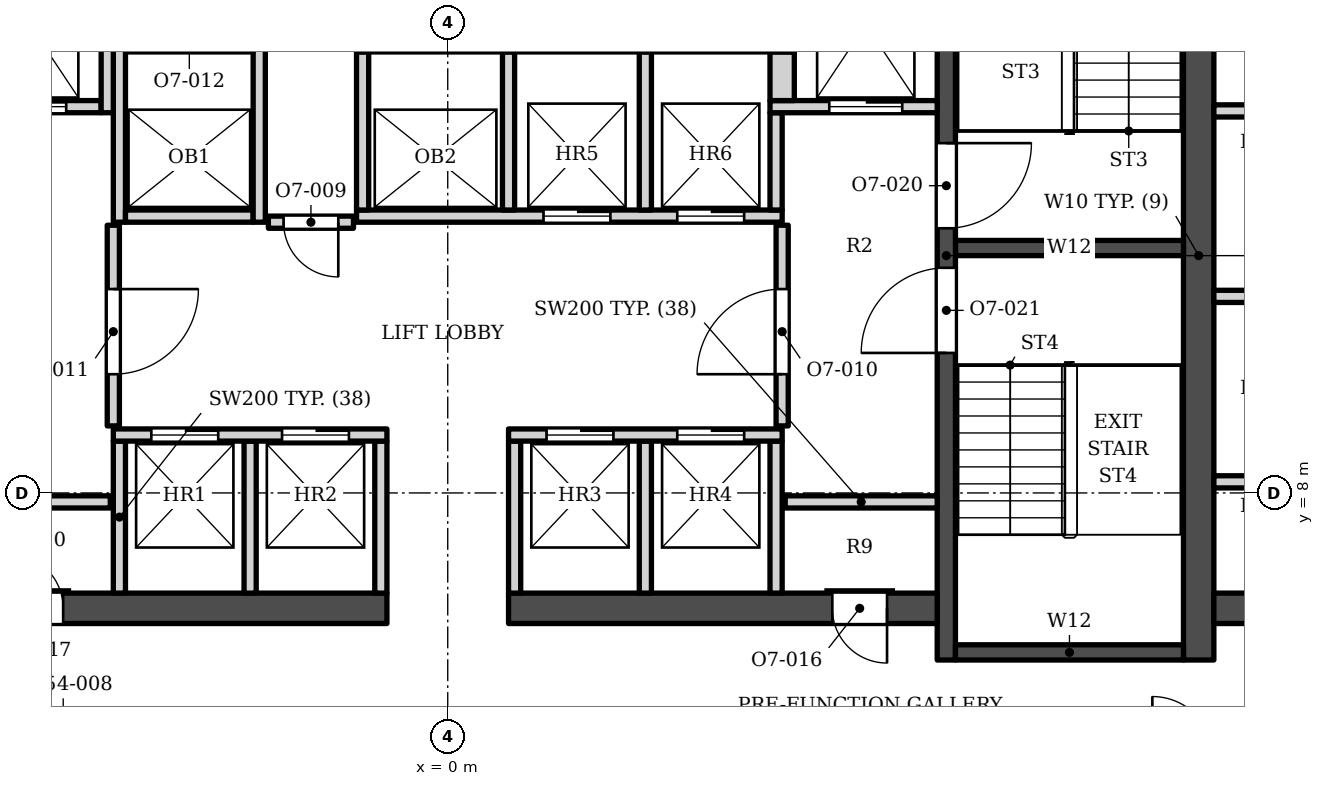
"""IFC4 building model, lengths in metres.
Left out: names, types, materials, properties, quantities, classifications, styles, units other than length and angle.
Written with IfcOpenShell. Run it as: python <this file> out.ifc"""

import sys

from ifc_helpers import new_model, si_unit, direction, frame, frame_2d, origin, place, context, subcontext, project, spatial, rectangle, extrude, element, fill, save


model = new_model("IFC4")
c1 = context("Model", 3, precision=1e-05, world=origin(), true_north=direction((0.0, 1.0)))
c2 = subcontext(c1, "Body", "Model", "MODEL_VIEW")
j1 = project(units=[si_unit("LENGTHUNIT", "METRE"), si_unit("PLANEANGLEUNIT", "RADIAN")], contexts=[c1])
p1 = place(None, origin())
s1 = spatial("IfcSite", under=j1, at=p1, CompositionType="ELEMENT")
p2 = place(p1, origin())
s2 = spatial("IfcBuilding", under=s1, at=p2, CompositionType="ELEMENT")
p3 = place(p2, frame((0.0, 0.0, 219.8)))
s3 = spatial("IfcBuildingStorey", under=s2, at=p3, CompositionType="ELEMENT", Elevation=219.8)
p4 = place(p3, frame((12.35, 5.253, 0.0), z_axis=(0.0, 0.0, 1.0), x_axis=(0.0, 1.0, 0.0)))
e1 = element("IfcWall", 1, at=p4, inside=s3, PredefinedType="SHEAR", context=c2, shape_type="SweptSolid", body=[
    extrude(rectangle(XDim=13.3, YDim=0.5, at=frame_2d((6.65, 0.0))), origin(), (0.0, 0.0, 1.0), 3.9),
])
p5 = place(p3, frame((8.2, 5.253, 0.0), z_axis=(0.0, 0.0, 1.0), x_axis=(0.0, 1.0, 0.0)))
e2 = element("IfcWall", 2, at=p5, inside=s3, PredefinedType="SHEAR", context=c2, shape_type="SweptSolid", body=[
    extrude(rectangle(XDim=13.3, YDim=0.3, at=frame_2d((6.65, 0.0))), origin(), (0.0, 0.0, 1.0), 3.9),
])
p6 = place(p5, frame((7.1, 0.0, 0.0)))
e3 = element("IfcOpeningElement", 3, at=p6, cuts=e2, PredefinedType="OPENING", context=c2, shape_type="SweptSolid", body=[
    extrude(rectangle(XDim=1.4, YDim=2.1, at=frame_2d((0.7, 1.05))), frame((0.0, 0.16, 0.0), z_axis=(0.0, -1.0, 0.0), x_axis=(1.0, 0.0, 0.0)), (0.0, 0.0, 1.0), 0.32),
])
p7 = place(p5, frame((5.05, 0.0, 0.0)))
e4 = element("IfcOpeningElement", 4, at=p7, cuts=e2, PredefinedType="OPENING", context=c2, shape_type="SweptSolid", body=[
    extrude(rectangle(XDim=1.4, YDim=2.1, at=frame_2d((0.7, 1.05))), frame((0.0, 0.16, 0.0), z_axis=(0.0, -1.0, 0.0), x_axis=(1.0, 0.0, 0.0)), (0.0, 0.0, 1.0), 0.32),
])
for number, where, z_axis, x_axis in (
    (5, (8.35, 12.028, 0.0), (0.0, 0.0, 1.0), (1.0, 0.0, 0.0)),
    (6, (8.35, 5.378, 0.0), (0.0, 0.0, 1.0), (1.0, 0.0, 0.0)),
):
    element("IfcWall", number, at=place(p3, frame(where, z_axis=z_axis, x_axis=x_axis)), inside=s3, PredefinedType="SHEAR", context=c2, shape_type="SweptSolid", body=[
        extrude(rectangle(XDim=3.75, YDim=0.25, at=frame_2d((1.875, 0.0))), origin(), (0.0, 0.0, 1.0), 3.9),
    ])
p8 = place(p3, frame((-8.05, 6.103, 0.0), z_axis=(0.0, 0.0, 1.0), x_axis=(1.0, 0.0, 0.0)))
e7 = element("IfcWall", 7, at=p8, inside=s3, PredefinedType="SHEAR", context=c2, shape_type="SweptSolid", body=[
    extrude(rectangle(XDim=7.05, YDim=0.5, at=frame_2d((3.525, 0.0))), origin(), (0.0, 0.0, 1.0), 3.9),
])
p9 = place(p8, frame((0.825, 0.0, 0.0)))
e8 = element("IfcOpeningElement", 8, at=p9, cuts=e7, PredefinedType="OPENING", context=c2, shape_type="SweptSolid", body=[
    extrude(rectangle(XDim=0.9, YDim=2.1, at=frame_2d((0.45, 1.05))), frame((0.0, 0.26, 0.0), z_axis=(0.0, -1.0, 0.0), x_axis=(1.0, 0.0, 0.0)), (0.0, 0.0, 1.0), 0.52),
])
p10 = place(p3, frame((1.0, 6.103, 0.0), z_axis=(0.0, 0.0, 1.0), x_axis=(1.0, 0.0, 0.0)))
e9 = element("IfcWall", 9, at=p10, inside=s3, PredefinedType="SHEAR", context=c2, shape_type="SweptSolid", body=[
    extrude(rectangle(XDim=7.05, YDim=0.5, at=frame_2d((3.525, 0.0))), origin(), (0.0, 0.0, 1.0), 3.9),
])
p11 = place(p10, frame((5.325, 0.0, 0.0)))
e10 = element("IfcOpeningElement", 10, at=p11, cuts=e9, PredefinedType="OPENING", context=c2, shape_type="SweptSolid", body=[
    extrude(rectangle(XDim=0.9, YDim=2.1, at=frame_2d((0.45, 1.05))), frame((0.0, 0.26, 0.0), z_axis=(0.0, -1.0, 0.0), x_axis=(1.0, 0.0, 0.0)), (0.0, 0.0, 1.0), 0.52),
])
p12 = place(p3, frame((12.6, 6.103, 0.0), z_axis=(0.0, 0.0, 1.0), x_axis=(1.0, 0.0, 0.0)))
e11 = element("IfcWall", 11, at=p12, inside=s3, PredefinedType="SHEAR", context=c2, shape_type="SweptSolid", body=[
    extrude(rectangle(XDim=1.3, YDim=0.5, at=frame_2d((0.65, 0.0))), origin(), (0.0, 0.0, 1.0), 3.9),
])
for number, where, z_axis, x_axis in (
    (12, (-5.4, 6.353, 0.0), (0.0, 0.0, 1.0), (0.0, 1.0, 0.0)),
    (13, (-3.25, 6.353, 0.0), (0.0, 0.0, 1.0), (0.0, 1.0, 0.0)),
    (14, (-1.1, 6.353, 0.0), (0.0, 0.0, 1.0), (0.0, 1.0, 0.0)),
    (15, (1.1, 6.353, 0.0), (0.0, 0.0, 1.0), (0.0, 1.0, 0.0)),
    (16, (3.25, 6.353, 0.0), (0.0, 0.0, 1.0), (0.0, 1.0, 0.0)),
    (17, (5.4, 6.353, 0.0), (0.0, 0.0, 1.0), (0.0, 1.0, 0.0)),
    (18, (-8.05, 7.853, 0.0), (0.0, 0.0, 1.0), (1.0, 0.0, 0.0)),
    (19, (5.55, 7.853, 0.0), (0.0, 0.0, 1.0), (1.0, 0.0, 0.0)),
):
    element("IfcWall", number, at=place(p3, frame(where, z_axis=z_axis, x_axis=x_axis)), inside=s3, PredefinedType="SOLIDWALL", context=c2, shape_type="SweptSolid", body=[
        extrude(rectangle(XDim=2.5, YDim=0.2, at=frame_2d((1.25, 0.0))), origin(), (0.0, 0.0, 1.0), 3.73),
    ])
p13 = place(p3, frame((12.6, 8.183, 0.0), z_axis=(0.0, 0.0, 1.0), x_axis=(1.0, 0.0, 0.0)))
e20 = element("IfcWall", 20, at=p13, inside=s3, PredefinedType="SOLIDWALL", context=c2, shape_type="SweptSolid", body=[
    extrude(rectangle(XDim=1.3, YDim=0.2, at=frame_2d((0.65, 0.0))), origin(), (0.0, 0.0, 1.0), 3.73),
])
p14 = place(p3, frame((-5.5, 8.953, 0.0), z_axis=(0.0, 0.0, 1.0), x_axis=(1.0, 0.0, 0.0)))
e21 = element("IfcWall", 21, at=p14, inside=s3, PredefinedType="SOLIDWALL", context=c2, shape_type="SweptSolid", body=[
    extrude(rectangle(XDim=4.5, YDim=0.2, at=frame_2d((2.25, 0.0))), origin(), (0.0, 0.0, 1.0), 3.73),
])
p15 = place(p14, frame((0.625, 0.0, 0.0)))
e22 = element("IfcOpeningElement", 22, at=p15, cuts=e21, PredefinedType="OPENING", context=c2, shape_type="SweptSolid", body=[
    extrude(rectangle(XDim=1.1, YDim=2.1, at=frame_2d((0.55, 1.05))), frame((0.0, 0.11, 0.0), z_axis=(0.0, -1.0, 0.0), x_axis=(1.0, 0.0, 0.0)), (0.0, 0.0, 1.0), 0.22),
])
p16 = place(p14, frame((2.775, 0.0, 0.0)))
e23 = element("IfcOpeningElement", 23, at=p16, cuts=e21, PredefinedType="OPENING", context=c2, shape_type="SweptSolid", body=[
    extrude(rectangle(XDim=1.1, YDim=2.1, at=frame_2d((0.55, 1.05))), frame((0.0, 0.11, 0.0), z_axis=(0.0, -1.0, 0.0), x_axis=(1.0, 0.0, 0.0)), (0.0, 0.0, 1.0), 0.22),
])
p17 = place(p3, frame((1.0, 8.953, 0.0), z_axis=(0.0, 0.0, 1.0), x_axis=(1.0, 0.0, 0.0)))
e24 = element("IfcWall", 24, at=p17, inside=s3, PredefinedType="SOLIDWALL", context=c2, shape_type="SweptSolid", body=[
    extrude(rectangle(XDim=4.5, YDim=0.2, at=frame_2d((2.25, 0.0))), origin(), (0.0, 0.0, 1.0), 3.73),
])
p18 = place(p17, frame((0.625, 0.0, 0.0)))
e25 = element("IfcOpeningElement", 25, at=p18, cuts=e24, PredefinedType="OPENING", context=c2, shape_type="SweptSolid", body=[
    extrude(rectangle(XDim=1.1, YDim=2.1, at=frame_2d((0.55, 1.05))), frame((0.0, 0.11, 0.0), z_axis=(0.0, -1.0, 0.0), x_axis=(1.0, 0.0, 0.0)), (0.0, 0.0, 1.0), 0.22),
])
p19 = place(p17, frame((2.775, 0.0, 0.0)))
e26 = element("IfcOpeningElement", 26, at=p19, cuts=e24, PredefinedType="OPENING", context=c2, shape_type="SweptSolid", body=[
    extrude(rectangle(XDim=1.1, YDim=2.1, at=frame_2d((0.55, 1.05))), frame((0.0, 0.11, 0.0), z_axis=(0.0, -1.0, 0.0), x_axis=(1.0, 0.0, 0.0)), (0.0, 0.0, 1.0), 0.22),
])
p20 = place(p3, frame((-5.5, 9.103, 0.0), z_axis=(0.0, 0.0, 1.0), x_axis=(0.0, 1.0, 0.0)))
e27 = element("IfcWall", 27, at=p20, inside=s3, PredefinedType="SOLIDWALL", context=c2, shape_type="SweptSolid", body=[
    extrude(rectangle(XDim=3.3, YDim=0.2, at=frame_2d((1.65, 0.0))), origin(), (0.0, 0.0, 1.0), 3.73),
])
p21 = place(p20, frame((0.85, 0.0, 0.0)))
e28 = element("IfcOpeningElement", 28, at=p21, cuts=e27, PredefinedType="OPENING", context=c2, shape_type="SweptSolid", body=[
    extrude(rectangle(XDim=1.4, YDim=2.1, at=frame_2d((0.7, 1.05))), frame((0.0, 0.11, 0.0), z_axis=(0.0, -1.0, 0.0), x_axis=(1.0, 0.0, 0.0)), (0.0, 0.0, 1.0), 0.22),
])
p22 = place(p3, frame((5.5, 9.103, 0.0), z_axis=(0.0, 0.0, 1.0), x_axis=(0.0, 1.0, 0.0)))
e29 = element("IfcWall", 29, at=p22, inside=s3, PredefinedType="SOLIDWALL", context=c2, shape_type="SweptSolid", body=[
    extrude(rectangle(XDim=3.3, YDim=0.2, at=frame_2d((1.65, 0.0))), origin(), (0.0, 0.0, 1.0), 3.73),
])
p23 = place(p22, frame((0.85, 0.0, 0.0)))
e30 = element("IfcOpeningElement", 30, at=p23, cuts=e29, PredefinedType="OPENING", context=c2, shape_type="SweptSolid", body=[
    extrude(rectangle(XDim=1.4, YDim=2.1, at=frame_2d((0.7, 1.05))), frame((0.0, 0.11, 0.0), z_axis=(0.0, -1.0, 0.0), x_axis=(1.0, 0.0, 0.0)), (0.0, 0.0, 1.0), 0.22),
])
p24 = place(p3, frame((12.6, 11.233, 0.0), z_axis=(0.0, 0.0, 1.0), x_axis=(1.0, 0.0, 0.0)))
e31 = element("IfcWall", 31, at=p24, inside=s3, PredefinedType="SOLIDWALL", context=c2, shape_type="SweptSolid", body=[
    extrude(rectangle(XDim=1.3, YDim=0.2, at=frame_2d((0.65, 0.0))), origin(), (0.0, 0.0, 1.0), 3.73),
])
p25 = place(p3, frame((-2.95, 12.453, 0.0), z_axis=(0.0, 0.0, 1.0), x_axis=(1.0, 0.0, 0.0)))
e32 = element("IfcWall", 32, at=p25, inside=s3, PredefinedType="SOLIDWALL", context=c2, shape_type="SweptSolid", body=[
    extrude(rectangle(XDim=1.4, YDim=0.2, at=frame_2d((0.7, 0.0))), origin(), (0.0, 0.0, 1.0), 3.73),
])
p26 = place(p25, frame((0.25, 0.0, 0.0)))
e33 = element("IfcOpeningElement", 33, at=p26, cuts=e32, PredefinedType="OPENING", context=c2, shape_type="SweptSolid", body=[
    extrude(rectangle(XDim=0.9, YDim=2.1, at=frame_2d((0.45, 1.05))), frame((0.0, 0.11, 0.0), z_axis=(0.0, -1.0, 0.0), x_axis=(1.0, 0.0, 0.0)), (0.0, 0.0, 1.0), 0.22),
])
p27 = place(p3, frame((-5.4, 12.453, 0.0), z_axis=(0.0, 0.0, 1.0), x_axis=(0.0, 1.0, 0.0)))
e34 = element("IfcWall", 34, at=p27, inside=s3, PredefinedType="SOLIDWALL", context=c2, shape_type="SweptSolid", body=[
    extrude(rectangle(XDim=3.0, YDim=0.2, at=frame_2d((1.5, 0.0))), origin(), (0.0, 0.0, 1.0), 3.73),
])
p28 = place(p3, frame((-5.3, 12.552, 0.0), z_axis=(0.0, 0.0, 1.0), x_axis=(1.0, 0.0, 0.0)))
e35 = element("IfcWall", 35, at=p28, inside=s3, PredefinedType="SOLIDWALL", context=c2, shape_type="SweptSolid", body=[
    extrude(rectangle(XDim=2.1, YDim=0.2, at=frame_2d((1.05, 0.0))), origin(), (0.0, 0.0, 1.0), 3.73),
])
p29 = place(p3, frame((-3.1, 12.453, 0.0), z_axis=(0.0, 0.0, 1.0), x_axis=(0.0, 1.0, 0.0)))
e36 = element("IfcWall", 36, at=p29, inside=s3, PredefinedType="SOLIDWALL", context=c2, shape_type="SweptSolid", body=[
    extrude(rectangle(XDim=3.0, YDim=0.2, at=frame_2d((1.5, 0.0))), origin(), (0.0, 0.0, 1.0), 3.73),
])
p30 = place(p3, frame((-1.5, 12.552, 0.0), z_axis=(0.0, 0.0, 1.0), x_axis=(1.0, 0.0, 0.0)))
e37 = element("IfcWall", 37, at=p30, inside=s3, PredefinedType="SOLIDWALL", context=c2, shape_type="SweptSolid", body=[
    extrude(rectangle(XDim=7.0, YDim=0.2, at=frame_2d((3.5, 0.0))), origin(), (0.0, 0.0, 1.0), 3.73),
])
p31 = place(p30, frame((3.075, 0.0, 0.0)))
e38 = element("IfcOpeningElement", 38, at=p31, cuts=e37, PredefinedType="OPENING", context=c2, shape_type="SweptSolid", body=[
    extrude(rectangle(XDim=1.1, YDim=2.1, at=frame_2d((0.55, 1.05))), frame((0.0, 0.11, 0.0), z_axis=(0.0, -1.0, 0.0), x_axis=(1.0, 0.0, 0.0)), (0.0, 0.0, 1.0), 0.22),
])
p32 = place(p30, frame((5.275, 0.0, 0.0)))
e39 = element("IfcOpeningElement", 39, at=p32, cuts=e37, PredefinedType="OPENING", context=c2, shape_type="SweptSolid", body=[
    extrude(rectangle(XDim=1.1, YDim=2.1, at=frame_2d((0.55, 1.05))), frame((0.0, 0.11, 0.0), z_axis=(0.0, -1.0, 0.0), x_axis=(1.0, 0.0, 0.0)), (0.0, 0.0, 1.0), 0.22),
])
for number, where, z_axis, x_axis in (
    (40, (-1.4, 12.653, 0.0), (0.0, 0.0, 1.0), (0.0, 1.0, 0.0)),
    (41, (1.0, 12.653, 0.0), (0.0, 0.0, 1.0), (0.0, 1.0, 0.0)),
    (42, (3.25, 12.653, 0.0), (0.0, 0.0, 1.0), (0.0, 1.0, 0.0)),
):
    element("IfcWall", number, at=place(p3, frame(where, z_axis=z_axis, x_axis=x_axis)), inside=s3, PredefinedType="SOLIDWALL", context=c2, shape_type="SweptSolid", body=[
        extrude(rectangle(XDim=2.6, YDim=0.2, at=frame_2d((1.3, 0.0))), origin(), (0.0, 0.0, 1.0), 3.73),
    ])
p33 = place(p3, frame((5.4, 12.653, 0.0), z_axis=(0.0, 0.0, 1.0), x_axis=(0.0, 1.0, 0.0)))
e43 = element("IfcWall", 43, at=p33, inside=s3, PredefinedType="SOLIDWALL", context=c2, shape_type="SweptSolid", body=[
    extrude(rectangle(XDim=1.6, YDim=0.2, at=frame_2d((0.8, 0.0))), origin(), (0.0, 0.0, 1.0), 3.73),
])
p34 = place(p3, frame((12.6, 14.283, 0.0), z_axis=(0.0, 0.0, 1.0), x_axis=(1.0, 0.0, 0.0)))
e44 = element("IfcWall", 44, at=p34, inside=s3, PredefinedType="SOLIDWALL", context=c2, shape_type="SweptSolid", body=[
    extrude(rectangle(XDim=1.3, YDim=0.2, at=frame_2d((0.65, 0.0))), origin(), (0.0, 0.0, 1.0), 3.73),
])
p35 = place(p3, frame((-8.05, 14.353, 0.0), z_axis=(0.0, 0.0, 1.0), x_axis=(1.0, 0.0, 0.0)))
e45 = element("IfcWall", 45, at=p35, inside=s3, PredefinedType="SOLIDWALL", context=c2, shape_type="SweptSolid", body=[
    extrude(rectangle(XDim=2.35, YDim=0.2, at=frame_2d((1.175, 0.0))), origin(), (0.0, 0.0, 1.0), 3.73),
])
p36 = place(p35, frame((0.575, 0.0, 0.0)))
e46 = element("IfcOpeningElement", 46, at=p36, cuts=e45, PredefinedType="OPENING", context=c2, shape_type="SweptSolid", body=[
    extrude(rectangle(XDim=1.2, YDim=2.1, at=frame_2d((0.6, 1.05))), frame((0.0, 0.11, 0.0), z_axis=(0.0, -1.0, 0.0), x_axis=(1.0, 0.0, 0.0)), (0.0, 0.0, 1.0), 0.22),
])
p37 = place(p3, frame((-5.6, 14.253, 0.0), z_axis=(0.0, 0.0, 1.0), x_axis=(0.0, 1.0, 0.0)))
e47 = element("IfcWall", 47, at=p37, inside=s3, PredefinedType="SOLIDWALL", context=c2, shape_type="SweptSolid", body=[
    extrude(rectangle(XDim=4.3, YDim=0.2, at=frame_2d((2.15, 0.0))), origin(), (0.0, 0.0, 1.0), 3.73),
])
p38 = place(p3, frame((5.3, 14.353, 0.0), z_axis=(0.0, 0.0, 1.0), x_axis=(1.0, 0.0, 0.0)))
e48 = element("IfcWall", 48, at=p38, inside=s3, PredefinedType="SOLIDWALL", context=c2, shape_type="SweptSolid", body=[
    extrude(rectangle(XDim=2.75, YDim=0.2, at=frame_2d((1.375, 0.0))), origin(), (0.0, 0.0, 1.0), 3.73),
])
p39 = place(p38, frame((0.975, 0.0, 0.0)))
e49 = element("IfcOpeningElement", 49, at=p39, cuts=e48, PredefinedType="OPENING", context=c2, shape_type="SweptSolid", body=[
    extrude(rectangle(XDim=1.2, YDim=2.1, at=frame_2d((0.6, 1.05))), frame((0.0, 0.11, 0.0), z_axis=(0.0, -1.0, 0.0), x_axis=(1.0, 0.0, 0.0)), (0.0, 0.0, 1.0), 0.22),
])
p40 = place(p3, frame((5.5, 14.453, 0.0), z_axis=(0.0, 0.0, 1.0), x_axis=(0.0, 1.0, 0.0)))
e50 = element("IfcWall", 50, at=p40, inside=s3, PredefinedType="SOLIDWALL", context=c2, shape_type="SweptSolid", body=[
    extrude(rectangle(XDim=0.8, YDim=0.4, at=frame_2d((0.4, 0.0))), origin(), (0.0, 0.0, 1.0), 3.73),
])
p41 = place(p3, frame((-5.3, 15.353, 0.0), z_axis=(0.0, 0.0, 1.0), x_axis=(1.0, 0.0, 0.0)))
e51 = element("IfcWall", 51, at=p41, inside=s3, PredefinedType="SOLIDWALL", context=c2, shape_type="SweptSolid", body=[
    extrude(rectangle(XDim=2.1, YDim=0.2, at=frame_2d((1.05, 0.0))), origin(), (0.0, 0.0, 1.0), 3.73),
])
p42 = place(p3, frame((-1.5, 15.353, 0.0), z_axis=(0.0, 0.0, 1.0), x_axis=(1.0, 0.0, 0.0)))
e52 = element("IfcWall", 52, at=p42, inside=s3, PredefinedType="SOLIDWALL", context=c2, shape_type="SweptSolid", body=[
    extrude(rectangle(XDim=7.2, YDim=0.2, at=frame_2d((3.6, 0.0))), origin(), (0.0, 0.0, 1.0), 3.73),
])
p43 = place(p15, origin())
e53 = element("IfcDoor", 53, at=p43, inside=s3, OperationType="DOUBLE_DOOR_SLIDING", PredefinedType="DOOR", context=c2, shape_type="SweptSolid", body=[
    extrude(rectangle(XDim=1.1, YDim=2.1, at=frame_2d((0.55, 1.05))), frame((0.0, 0.025, 0.0), z_axis=(0.0, -1.0, 0.0), x_axis=(1.0, 0.0, 0.0)), (0.0, 0.0, 1.0), 0.05),
])
fill(e22, e53)
p44 = place(p16, origin())
e54 = element("IfcDoor", 54, at=p44, inside=s3, OperationType="DOUBLE_DOOR_SLIDING", PredefinedType="DOOR", context=c2, shape_type="SweptSolid", body=[
    extrude(rectangle(XDim=1.1, YDim=2.1, at=frame_2d((0.55, 1.05))), frame((0.0, 0.025, 0.0), z_axis=(0.0, -1.0, 0.0), x_axis=(1.0, 0.0, 0.0)), (0.0, 0.0, 1.0), 0.05),
])
fill(e23, e54)
p45 = place(p18, origin())
e55 = element("IfcDoor", 55, at=p45, inside=s3, OperationType="DOUBLE_DOOR_SLIDING", PredefinedType="DOOR", context=c2, shape_type="SweptSolid", body=[
    extrude(rectangle(XDim=1.1, YDim=2.1, at=frame_2d((0.55, 1.05))), frame((0.0, 0.025, 0.0), z_axis=(0.0, -1.0, 0.0), x_axis=(1.0, 0.0, 0.0)), (0.0, 0.0, 1.0), 0.05),
])
fill(e25, e55)
p46 = place(p19, origin())
e56 = element("IfcDoor", 56, at=p46, inside=s3, OperationType="DOUBLE_DOOR_SLIDING", PredefinedType="DOOR", context=c2, shape_type="SweptSolid", body=[
    extrude(rectangle(XDim=1.1, YDim=2.1, at=frame_2d((0.55, 1.05))), frame((0.0, 0.025, 0.0), z_axis=(0.0, -1.0, 0.0), x_axis=(1.0, 0.0, 0.0)), (0.0, 0.0, 1.0), 0.05),
])
fill(e26, e56)
p47 = place(p31, origin())
e57 = element("IfcDoor", 57, at=p47, inside=s3, OperationType="DOUBLE_DOOR_SLIDING", PredefinedType="DOOR", context=c2, shape_type="SweptSolid", body=[
    extrude(rectangle(XDim=1.1, YDim=2.1, at=frame_2d((0.55, 1.05))), frame((0.0, 0.025, 0.0), z_axis=(0.0, -1.0, 0.0), x_axis=(1.0, 0.0, 0.0)), (0.0, 0.0, 1.0), 0.05),
])
fill(e38, e57)
p48 = place(p32, origin())
e58 = element("IfcDoor", 58, at=p48, inside=s3, OperationType="DOUBLE_DOOR_SLIDING", PredefinedType="DOOR", context=c2, shape_type="SweptSolid", body=[
    extrude(rectangle(XDim=1.1, YDim=2.1, at=frame_2d((0.55, 1.05))), frame((0.0, 0.025, 0.0), z_axis=(0.0, -1.0, 0.0), x_axis=(1.0, 0.0, 0.0)), (0.0, 0.0, 1.0), 0.05),
])
fill(e39, e58)
p49 = place(p36, origin())
e59 = element("IfcDoor", 59, at=p49, inside=s3, OperationType="DOUBLE_DOOR_SLIDING", PredefinedType="DOOR", context=c2, shape_type="SweptSolid", body=[
    extrude(rectangle(XDim=1.2, YDim=2.1, at=frame_2d((0.6, 1.05))), frame((0.0, 0.025, 0.0), z_axis=(0.0, -1.0, 0.0), x_axis=(1.0, 0.0, 0.0)), (0.0, 0.0, 1.0), 0.05),
])
fill(e46, e59)
p50 = place(p39, origin())
e60 = element("IfcDoor", 60, at=p50, inside=s3, OperationType="DOUBLE_DOOR_SLIDING", PredefinedType="DOOR", context=c2, shape_type="SweptSolid", body=[
    extrude(rectangle(XDim=1.2, YDim=2.1, at=frame_2d((0.6, 1.05))), frame((0.0, 0.025, 0.0), z_axis=(0.0, -1.0, 0.0), x_axis=(1.0, 0.0, 0.0)), (0.0, 0.0, 1.0), 0.05),
])
fill(e49, e60)
p51 = place(p6, origin())
e61 = element("IfcDoor", 61, at=p51, inside=s3, OperationType="SINGLE_SWING_RIGHT", PredefinedType="DOOR", context=c2, shape_type="SweptSolid", body=[
    extrude(rectangle(XDim=1.4, YDim=2.1, at=frame_2d((0.7, 1.05))), frame((0.0, 0.025, 0.0), z_axis=(0.0, -1.0, 0.0), x_axis=(1.0, 0.0, 0.0)), (0.0, 0.0, 1.0), 0.05),
])
fill(e3, e61)
p52 = place(p7, origin())
e62 = element("IfcDoor", 62, at=p52, inside=s3, OperationType="SINGLE_SWING_LEFT", PredefinedType="DOOR", context=c2, shape_type="SweptSolid", body=[
    extrude(rectangle(XDim=1.4, YDim=2.1, at=frame_2d((0.7, 1.05))), frame((0.0, 0.025, 0.0), z_axis=(0.0, -1.0, 0.0), x_axis=(1.0, 0.0, 0.0)), (0.0, 0.0, 1.0), 0.05),
])
fill(e4, e62)
p53 = place(p26, origin())
e63 = element("IfcDoor", 63, at=p53, inside=s3, OperationType="SINGLE_SWING_RIGHT", PredefinedType="DOOR", context=c2, shape_type="SweptSolid", body=[
    extrude(rectangle(XDim=0.9, YDim=2.1, at=frame_2d((0.45, 1.05))), frame((0.0, 0.025, 0.0), z_axis=(0.0, -1.0, 0.0), x_axis=(1.0, 0.0, 0.0)), (0.0, 0.0, 1.0), 0.05),
])
fill(e33, e63)
p54 = place(p21, origin())
e64 = element("IfcDoor", 64, at=p54, inside=s3, OperationType="SINGLE_SWING_RIGHT", PredefinedType="DOOR", context=c2, shape_type="SweptSolid", body=[
    extrude(rectangle(XDim=1.4, YDim=2.1, at=frame_2d((0.7, 1.05))), frame((0.0, 0.025, 0.0), z_axis=(0.0, -1.0, 0.0), x_axis=(1.0, 0.0, 0.0)), (0.0, 0.0, 1.0), 0.05),
])
fill(e28, e64)
p55 = place(p23, origin())
e65 = element("IfcDoor", 65, at=p55, inside=s3, OperationType="SINGLE_SWING_LEFT", PredefinedType="DOOR", context=c2, shape_type="SweptSolid", body=[
    extrude(rectangle(XDim=1.4, YDim=2.1, at=frame_2d((0.7, 1.05))), frame((0.0, 0.025, 0.0), z_axis=(0.0, -1.0, 0.0), x_axis=(1.0, 0.0, 0.0)), (0.0, 0.0, 1.0), 0.05),
])
fill(e30, e65)
p56 = place(p9, origin())
e66 = element("IfcDoor", 66, at=p56, inside=s3, OperationType="SINGLE_SWING_LEFT", PredefinedType="DOOR", context=c2, shape_type="SweptSolid", body=[
    extrude(rectangle(XDim=0.9, YDim=2.1, at=frame_2d((0.45, 1.05))), frame((0.0, 0.025, 0.0), z_axis=(0.0, -1.0, 0.0), x_axis=(1.0, 0.0, 0.0)), (0.0, 0.0, 1.0), 0.05),
])
fill(e8, e66)
p57 = place(p11, origin())
e67 = element("IfcDoor", 67, at=p57, inside=s3, OperationType="SINGLE_SWING_RIGHT", PredefinedType="DOOR", context=c2, shape_type="SweptSolid", body=[
    extrude(rectangle(XDim=0.9, YDim=2.1, at=frame_2d((0.45, 1.05))), frame((0.0, 0.025, 0.0), z_axis=(0.0, -1.0, 0.0), x_axis=(1.0, 0.0, 0.0)), (0.0, 0.0, 1.0), 0.05),
])
fill(e10, e67)
save(model, sys.argv[1])
